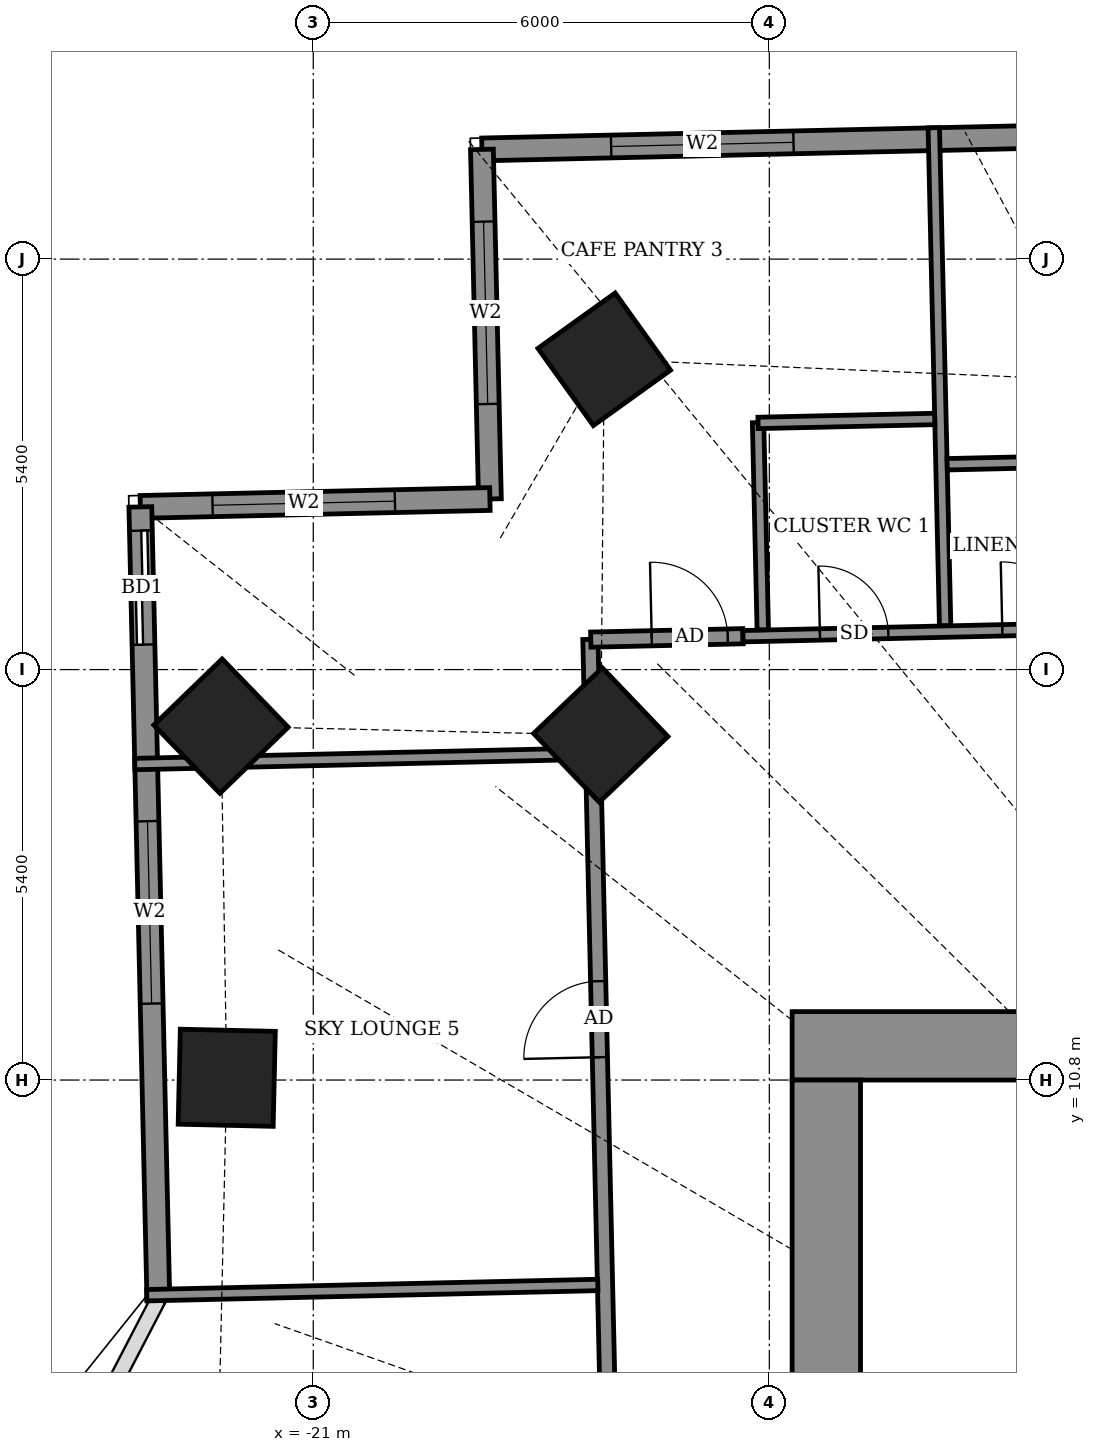
"""IFC4 building model, lengths in metres.
Left out: names, types, materials, properties, quantities, classifications, styles, units other than length and angle.
Written with IfcOpenShell. Run it as: python <this file> out.ifc"""

import sys

from ifc_helpers import new_model, si_unit, direction, frame, frame_2d, origin, origin_2d, place, context, subcontext, project, spatial, rectangle, extrude, element, fill, save


model = new_model("IFC4")
c1 = context("Model", 3, precision=1e-05, world=origin(), true_north=direction((0.0, 1.0)))
c2 = subcontext(c1, "Body", "Model", "MODEL_VIEW")
j1 = project(units=[si_unit("LENGTHUNIT", "METRE"), si_unit("PLANEANGLEUNIT", "RADIAN")], contexts=[c1])
p1 = place(None, origin())
s1 = spatial("IfcSite", under=j1, at=p1, CompositionType="ELEMENT")
p2 = place(p1, origin())
s2 = spatial("IfcBuilding", under=s1, at=p2, CompositionType="ELEMENT")
p3 = place(p2, frame((0.0, 0.0, 170.7)))
s3 = spatial("IfcBuildingStorey", under=s2, at=p3, CompositionType="ELEMENT", Elevation=170.7)
for number, where, z_axis, x_axis in (
    (1, (-17.172, 20.282, -0.55), (0.0, 0.0, 1.0), (-0.813, -0.583, 0.0)),
    (2, (-17.217, 15.339, -0.55), (0.0, 0.0, 1.0), (-0.723, -0.691, 0.0)),
    (3, (-22.213, 15.456, -0.55), (0.0, 0.0, 1.0), (-0.719, -0.695, 0.0)),
    (4, (-22.138, 10.83, -0.55), (0.0, 0.0, 1.0), (-0.023, -1.0, 0.0)),
):
    element("IfcColumn", number, at=place(p3, frame(where, z_axis=z_axis, x_axis=x_axis)), inside=s3, PredefinedType="COLUMN", context=c2, shape_type="SweptSolid", body=[
        extrude(rectangle(XDim=1.25, YDim=1.25, at=origin_2d()), origin(), (0.0, 0.0, 1.0), 4.6),
    ])
p4 = place(p3, frame((21.589, 23.959, 0.0), z_axis=(0.0, 0.0, 1.0), x_axis=(-0.999742671382, -0.022684598702, 0.0)))
e5 = element("IfcWall", 5, at=p4, inside=s3, PredefinedType="SOLIDWALL", context=c2, shape_type="SweptSolid", body=[
    extrude(rectangle(XDim=40.381, YDim=0.3, at=frame_2d((20.19, 0.0))), origin(), (0.0, 0.0, 1.0), 2.85),
])
p5 = place(p4, frame((2.89, 0.0, 0.0)))
e6 = element("IfcOpeningElement", 6, at=p5, cuts=e5, PredefinedType="OPENING", context=c2, shape_type="SweptSolid", body=[
    extrude(rectangle(XDim=1.5, YDim=2.4, at=frame_2d((0.75, 1.2))), frame((0.0, 0.16, 0.0), z_axis=(0.0, -1.0, 0.0), x_axis=(1.0, 0.0, 0.0)), (0.0, 0.0, 1.0), 0.32),
])
p6 = place(p4, frame((10.48, 0.0, 0.9)))
e7 = element("IfcOpeningElement", 7, at=p6, cuts=e5, PredefinedType="OPENING", context=c2, shape_type="SweptSolid", body=[
    extrude(rectangle(XDim=2.4, YDim=1.5, at=frame_2d((1.2, 0.75))), frame((0.0, 0.16, 0.0), z_axis=(0.0, -1.0, 0.0), x_axis=(1.0, 0.0, 0.0)), (0.0, 0.0, 1.0), 0.32),
])
p7 = place(p4, frame((17.68, 0.0, 0.0)))
e8 = element("IfcOpeningElement", 8, at=p7, cuts=e5, PredefinedType="OPENING", context=c2, shape_type="SweptSolid", body=[
    extrude(rectangle(XDim=1.5, YDim=2.4, at=frame_2d((0.75, 1.2))), frame((0.0, 0.16, 0.0), z_axis=(0.0, -1.0, 0.0), x_axis=(1.0, 0.0, 0.0)), (0.0, 0.0, 1.0), 0.32),
])
p8 = place(p4, frame((22.705, 0.0, 0.0)))
e9 = element("IfcOpeningElement", 9, at=p8, cuts=e5, PredefinedType="OPENING", context=c2, shape_type="SweptSolid", body=[
    extrude(rectangle(XDim=1.5, YDim=2.4, at=frame_2d((0.75, 1.2))), frame((0.0, 0.16, 0.0), z_axis=(0.0, -1.0, 0.0), x_axis=(1.0, 0.0, 0.0)), (0.0, 0.0, 1.0), 0.32),
])
p9 = place(p4, frame((29.005, 0.0, 0.9)))
e10 = element("IfcOpeningElement", 10, at=p9, cuts=e5, PredefinedType="OPENING", context=c2, shape_type="SweptSolid", body=[
    extrude(rectangle(XDim=2.4, YDim=1.5, at=frame_2d((1.2, 0.75))), frame((0.0, 0.16, 0.0), z_axis=(0.0, -1.0, 0.0), x_axis=(1.0, 0.0, 0.0)), (0.0, 0.0, 1.0), 0.32),
])
p10 = place(p4, frame((36.28, 0.0, 0.9)))
e11 = element("IfcOpeningElement", 11, at=p10, cuts=e5, PredefinedType="OPENING", context=c2, shape_type="SweptSolid", body=[
    extrude(rectangle(XDim=2.4, YDim=1.5, at=frame_2d((1.2, 0.75))), frame((0.0, 0.16, 0.0), z_axis=(0.0, -1.0, 0.0), x_axis=(1.0, 0.0, 0.0)), (0.0, 0.0, 1.0), 0.32),
])
p11 = place(p3, frame((-18.781, 23.043, 0.0), z_axis=(0.0, 0.0, 1.0), x_axis=(0.022821468877, -0.999739556364, 0.0)))
e12 = element("IfcWall", 12, at=p11, inside=s3, PredefinedType="SOLIDWALL", context=c2, shape_type="SweptSolid", body=[
    extrude(rectangle(XDim=4.6, YDim=0.3, at=frame_2d((2.3, 0.0))), origin(), (0.0, 0.0, 1.0), 2.85),
])
p12 = place(p11, frame((0.95, 0.0, 0.9)))
e13 = element("IfcOpeningElement", 13, at=p12, cuts=e12, PredefinedType="OPENING", context=c2, shape_type="SweptSolid", body=[
    extrude(rectangle(XDim=2.4, YDim=1.5, at=frame_2d((1.2, 0.75))), frame((0.0, 0.16, 0.0), z_axis=(0.0, -1.0, 0.0), x_axis=(1.0, 0.0, 0.0)), (0.0, 0.0, 1.0), 0.32),
])
p13 = place(p3, frame((-18.676, 18.444, 0.0), z_axis=(0.0, 0.0, 1.0), x_axis=(-0.999744377441, -0.022609285172, 0.0)))
e14 = element("IfcWall", 14, at=p13, inside=s3, PredefinedType="SOLIDWALL", context=c2, shape_type="SweptSolid", body=[
    extrude(rectangle(XDim=4.6, YDim=0.3, at=frame_2d((2.3, 0.0))), origin(), (0.0, 0.0, 1.0), 2.85),
])
p14 = place(p13, frame((1.25, 0.0, 0.9)))
e15 = element("IfcOpeningElement", 15, at=p14, cuts=e14, PredefinedType="OPENING", context=c2, shape_type="SweptSolid", body=[
    extrude(rectangle(XDim=2.4, YDim=1.5, at=frame_2d((1.2, 0.75))), frame((0.0, 0.16, 0.0), z_axis=(0.0, -1.0, 0.0), x_axis=(1.0, 0.0, 0.0)), (0.0, 0.0, 1.0), 0.32),
])
p15 = place(p3, frame((-23.275, 18.34, 0.0), z_axis=(0.0, 0.0, 1.0), x_axis=(0.022705985163, -0.999742185885, 0.0)))
e16 = element("IfcWall", 16, at=p15, inside=s3, PredefinedType="SOLIDWALL", context=c2, shape_type="SweptSolid", body=[
    extrude(rectangle(XDim=10.43, YDim=0.3, at=frame_2d((5.215, 0.0))), origin(), (0.0, 0.0, 1.0), 2.85),
])
p16 = place(p15, frame((0.312, 0.0, 0.0)))
e17 = element("IfcOpeningElement", 17, at=p16, cuts=e16, PredefinedType="OPENING", context=c2, shape_type="SweptSolid", body=[
    extrude(rectangle(XDim=1.5, YDim=2.4, at=frame_2d((0.75, 1.2))), frame((0.0, 0.16, 0.0), z_axis=(0.0, -1.0, 0.0), x_axis=(1.0, 0.0, 0.0)), (0.0, 0.0, 1.0), 0.32),
])
p17 = place(p15, frame((4.136, 0.0, 0.9)))
e18 = element("IfcOpeningElement", 18, at=p17, cuts=e16, PredefinedType="OPENING", context=c2, shape_type="SweptSolid", body=[
    extrude(rectangle(XDim=2.4, YDim=1.5, at=frame_2d((1.2, 0.75))), frame((0.0, 0.16, 0.0), z_axis=(0.0, -1.0, 0.0), x_axis=(1.0, 0.0, 0.0)), (0.0, 0.0, 1.0), 0.32),
])
p18 = place(p3, frame((-16.65, -14.418, 0.0), z_axis=(0.0, 0.0, 1.0), x_axis=(-0.022695485329, 0.9997424243, 0.0)))
e19 = element("IfcWall", 19, at=p18, inside=s3, PredefinedType="PARTITIONING", context=c2, shape_type="SweptSolid", body=[
    extrude(rectangle(XDim=31.024, YDim=0.2, at=frame_2d((15.512, 0.0))), origin(), (0.0, 0.0, 1.0), 2.75),
])
p19 = place(p18, frame((0.2, 0.0, 0.0)))
e20 = element("IfcOpeningElement", 20, at=p19, cuts=e19, PredefinedType="OPENING", context=c2, shape_type="SweptSolid", body=[
    extrude(rectangle(XDim=1.0, YDim=2.1, at=frame_2d((0.5, 1.05))), frame((0.0, 0.11, 0.0), z_axis=(0.0, -1.0, 0.0), x_axis=(1.0, 0.0, 0.0)), (0.0, 0.0, 1.0), 0.22),
])
p20 = place(p18, frame((25.525, 0.0, 0.0)))
e21 = element("IfcOpeningElement", 21, at=p20, cuts=e19, PredefinedType="OPENING", context=c2, shape_type="SweptSolid", body=[
    extrude(rectangle(XDim=1.0, YDim=2.1, at=frame_2d((0.5, 1.05))), frame((0.0, 0.11, 0.0), z_axis=(0.0, -1.0, 0.0), x_axis=(1.0, 0.0, 0.0)), (0.0, 0.0, 1.0), 0.22),
])
p21 = place(p18, frame((19.595, 0.0, 0.0)))
e22 = element("IfcOpeningElement", 22, at=p21, cuts=e19, PredefinedType="OPENING", context=c2, shape_type="SweptSolid", body=[
    extrude(rectangle(XDim=1.0, YDim=2.1, at=frame_2d((0.5, 1.05))), frame((0.0, 0.11, 0.0), z_axis=(0.0, -1.0, 0.0), x_axis=(1.0, 0.0, 0.0)), (0.0, 0.0, 1.0), 0.22),
])
p22 = place(p18, frame((13.825, 0.0, 0.0)))
e23 = element("IfcOpeningElement", 23, at=p22, cuts=e19, PredefinedType="OPENING", context=c2, shape_type="SweptSolid", body=[
    extrude(rectangle(XDim=1.0, YDim=2.1, at=frame_2d((0.5, 1.05))), frame((0.0, 0.11, 0.0), z_axis=(0.0, -1.0, 0.0), x_axis=(1.0, 0.0, 0.0)), (0.0, 0.0, 1.0), 0.22),
])
p23 = place(p18, frame((16.275, 0.0, 0.0)))
e24 = element("IfcOpeningElement", 24, at=p23, cuts=e19, PredefinedType="OPENING", context=c2, shape_type="SweptSolid", body=[
    extrude(rectangle(XDim=0.9, YDim=2.1, at=frame_2d((0.45, 1.05))), frame((0.0, 0.11, 0.0), z_axis=(0.0, -1.0, 0.0), x_axis=(1.0, 0.0, 0.0)), (0.0, 0.0, 1.0), 0.22),
])
p24 = place(p18, frame((11.65, 0.0, 0.0)))
e25 = element("IfcOpeningElement", 25, at=p24, cuts=e19, PredefinedType="OPENING", context=c2, shape_type="SweptSolid", body=[
    extrude(rectangle(XDim=1.0, YDim=2.1, at=frame_2d((0.5, 1.05))), frame((0.0, 0.11, 0.0), z_axis=(0.0, -1.0, 0.0), x_axis=(1.0, 0.0, 0.0)), (0.0, 0.0, 1.0), 0.22),
])
p25 = place(p18, frame((9.525, 0.0, 0.0)))
e26 = element("IfcOpeningElement", 26, at=p25, cuts=e19, PredefinedType="OPENING", context=c2, shape_type="SweptSolid", body=[
    extrude(rectangle(XDim=0.9, YDim=2.1, at=frame_2d((0.45, 1.05))), frame((0.0, 0.11, 0.0), z_axis=(0.0, -1.0, 0.0), x_axis=(1.0, 0.0, 0.0)), (0.0, 0.0, 1.0), 0.22),
])
p26 = place(p18, frame((3.337, 0.0, 0.0)))
e27 = element("IfcOpeningElement", 27, at=p26, cuts=e19, PredefinedType="OPENING", context=c2, shape_type="SweptSolid", body=[
    extrude(rectangle(XDim=1.0, YDim=2.1, at=frame_2d((0.5, 1.05))), frame((0.0, 0.11, 0.0), z_axis=(0.0, -1.0, 0.0), x_axis=(1.0, 0.0, 0.0)), (0.0, 0.0, 1.0), 0.22),
])
p27 = place(p18, frame((7.025, 0.0, 0.0)))
e28 = element("IfcOpeningElement", 28, at=p27, cuts=e19, PredefinedType="OPENING", context=c2, shape_type="SweptSolid", body=[
    extrude(rectangle(XDim=0.9, YDim=2.1, at=frame_2d((0.45, 1.05))), frame((0.0, 0.11, 0.0), z_axis=(0.0, -1.0, 0.0), x_axis=(1.0, 0.0, 0.0)), (0.0, 0.0, 1.0), 0.22),
])
p28 = place(p3, frame((-23.19, 7.969, 0.0), z_axis=(0.0, 0.0, 1.0), x_axis=(0.999741261868, 0.022746633113, 0.0)))
e29 = element("IfcWall", 29, at=p28, inside=s3, PredefinedType="PARTITIONING", context=c2, shape_type="SweptSolid", body=[
    extrude(rectangle(XDim=5.935, YDim=0.15, at=frame_2d((2.968, 0.0))), origin(), (0.0, 0.0, 1.0), 2.75),
])
p29 = place(p3, frame((-23.348, 14.957, 0.0), z_axis=(0.0, 0.0, 1.0), x_axis=(0.999741176717, 0.022750375323, 0.0)))
e30 = element("IfcWall", 30, at=p29, inside=s3, PredefinedType="PARTITIONING", context=c2, shape_type="SweptSolid", body=[
    extrude(rectangle(XDim=5.934, YDim=0.15, at=frame_2d((2.967, 0.0))), origin(), (0.0, 0.0, 1.0), 2.75),
])
p30 = place(p3, frame((-17.349, 16.594, 0.0), z_axis=(0.0, 0.0, 1.0), x_axis=(0.999748401469, 0.02243064332, 0.0)))
e31 = element("IfcWall", 31, at=p30, inside=s3, PredefinedType="PARTITIONING", context=c2, shape_type="SweptSolid", body=[
    extrude(rectangle(XDim=2.003, YDim=0.2, at=frame_2d((1.001, 0.0))), origin(), (0.0, 0.0, 1.0), 2.75),
])
p31 = place(p30, frame((0.802, 0.0, 0.0)))
e32 = element("IfcOpeningElement", 32, at=p31, cuts=e31, PredefinedType="OPENING", context=c2, shape_type="SweptSolid", body=[
    extrude(rectangle(XDim=1.0, YDim=2.1, at=frame_2d((0.5, 1.05))), frame((0.0, 0.11, 0.0), z_axis=(0.0, -1.0, 0.0), x_axis=(1.0, 0.0, 0.0)), (0.0, 0.0, 1.0), 0.22),
])
p32 = place(p3, frame((-15.346, 16.639, 0.0), z_axis=(0.0, 0.0, 1.0), x_axis=(0.999742506322, 0.022691871978, 0.0)))
e33 = element("IfcWall", 33, at=p32, inside=s3, PredefinedType="PARTITIONING", context=c2, shape_type="SweptSolid", body=[
    extrude(rectangle(XDim=30.233, YDim=0.15, at=frame_2d((15.116, 0.0))), origin(), (0.0, 0.0, 1.0), 2.85),
])
p33 = place(p32, frame((23.712, 0.0, 0.0)))
e34 = element("IfcOpeningElement", 34, at=p33, cuts=e33, PredefinedType="OPENING", context=c2, shape_type="SweptSolid", body=[
    extrude(rectangle(XDim=1.0, YDim=2.1, at=frame_2d((0.5, 1.05))), frame((0.0, 0.085, 0.0), z_axis=(0.0, -1.0, 0.0), x_axis=(1.0, 0.0, 0.0)), (0.0, 0.0, 1.0), 0.17),
])
p34 = place(p32, frame((28.012, 0.0, 0.0)))
e35 = element("IfcOpeningElement", 35, at=p34, cuts=e33, PredefinedType="OPENING", context=c2, shape_type="SweptSolid", body=[
    extrude(rectangle(XDim=0.9, YDim=2.1, at=frame_2d((0.45, 1.05))), frame((0.0, 0.085, 0.0), z_axis=(0.0, -1.0, 0.0), x_axis=(1.0, 0.0, 0.0)), (0.0, 0.0, 1.0), 0.17),
])
p35 = place(p32, frame((19.412, 0.0, 0.0)))
e36 = element("IfcOpeningElement", 36, at=p35, cuts=e33, PredefinedType="OPENING", context=c2, shape_type="SweptSolid", body=[
    extrude(rectangle(XDim=0.9, YDim=2.1, at=frame_2d((0.45, 1.05))), frame((0.0, 0.085, 0.0), z_axis=(0.0, -1.0, 0.0), x_axis=(1.0, 0.0, 0.0)), (0.0, 0.0, 1.0), 0.17),
])
p36 = place(p32, frame((11.987, 0.0, 0.0)))
e37 = element("IfcOpeningElement", 37, at=p36, cuts=e33, PredefinedType="OPENING", context=c2, shape_type="SweptSolid", body=[
    extrude(rectangle(XDim=0.9, YDim=2.1, at=frame_2d((0.45, 1.05))), frame((0.0, 0.085, 0.0), z_axis=(0.0, -1.0, 0.0), x_axis=(1.0, 0.0, 0.0)), (0.0, 0.0, 1.0), 0.17),
])
p37 = place(p32, frame((7.587, 0.0, 0.0)))
e38 = element("IfcOpeningElement", 38, at=p37, cuts=e33, PredefinedType="OPENING", context=c2, shape_type="SweptSolid", body=[
    extrude(rectangle(XDim=1.0, YDim=2.1, at=frame_2d((0.5, 1.05))), frame((0.0, 0.085, 0.0), z_axis=(0.0, -1.0, 0.0), x_axis=(1.0, 0.0, 0.0)), (0.0, 0.0, 1.0), 0.17),
])
p38 = place(p32, frame((3.412, 0.0, 0.0)))
e39 = element("IfcOpeningElement", 39, at=p38, cuts=e33, PredefinedType="OPENING", context=c2, shape_type="SweptSolid", body=[
    extrude(rectangle(XDim=0.9, YDim=2.1, at=frame_2d((0.45, 1.05))), frame((0.0, 0.085, 0.0), z_axis=(0.0, -1.0, 0.0), x_axis=(1.0, 0.0, 0.0)), (0.0, 0.0, 1.0), 0.17),
])
p39 = place(p32, frame((1.012, 0.0, 0.0)))
e40 = element("IfcOpeningElement", 40, at=p39, cuts=e33, PredefinedType="OPENING", context=c2, shape_type="SweptSolid", body=[
    extrude(rectangle(XDim=0.9, YDim=2.1, at=frame_2d((0.45, 1.05))), frame((0.0, 0.085, 0.0), z_axis=(0.0, -1.0, 0.0), x_axis=(1.0, 0.0, 0.0)), (0.0, 0.0, 1.0), 0.17),
])
p40 = place(p3, frame((-15.086, 16.724, 0.0), z_axis=(0.0, 0.0, 1.0), x_axis=(-0.022751926344, 0.99974114142, 0.0)))
e41 = element("IfcWall", 41, at=p40, inside=s3, PredefinedType="PARTITIONING", context=c2, shape_type="SweptSolid", body=[
    extrude(rectangle(XDim=2.726, YDim=0.15, at=frame_2d((1.363, 0.0))), origin(), (0.0, 0.0, 1.0), 2.85),
])
p41 = place(p3, frame((-12.687, 16.779, 0.0), z_axis=(0.0, 0.0, 1.0), x_axis=(-0.022734951231, 0.999741527592, 0.0)))
e42 = element("IfcWall", 42, at=p41, inside=s3, PredefinedType="PARTITIONING", context=c2, shape_type="SweptSolid", body=[
    extrude(rectangle(XDim=6.551, YDim=0.15, at=frame_2d((3.275, 0.0))), origin(), (0.0, 0.0, 1.0), 2.75),
])
p42 = place(p3, frame((-12.66, 18.901, 0.0), z_axis=(0.0, 0.0, 1.0), x_axis=(0.999737862264, 0.022895561926, 0.0)))
e43 = element("IfcWall", 43, at=p42, inside=s3, PredefinedType="PARTITIONING", context=c2, shape_type="SweptSolid", body=[
    extrude(rectangle(XDim=2.324, YDim=0.15, at=frame_2d((1.162, 0.0))), origin(), (0.0, 0.0, 1.0), 2.85),
])
p43 = place(p3, frame((-15.148, 19.445, 0.0), z_axis=(0.0, 0.0, 1.0), x_axis=(0.999749744571, 0.022370700241, 0.0)))
e44 = element("IfcWall", 44, at=p43, inside=s3, PredefinedType="PARTITIONING", context=c2, shape_type="SweptSolid", body=[
    extrude(rectangle(XDim=2.324, YDim=0.15, at=frame_2d((1.162, 0.0))), origin(), (0.0, 0.0, 1.0), 2.75),
])
p44 = place(p3, frame((-14.7, 11.25, 0.0), z_axis=(0.0, 0.0, 1.0), x_axis=(1.0, 0.0, 0.0)))
e45 = element("IfcWall", 45, at=p44, inside=s3, PredefinedType="SHEAR", context=c2, shape_type="SweptSolid", body=[
    extrude(rectangle(XDim=29.4, YDim=0.9, at=frame_2d((14.7, 0.0))), origin(), (0.0, 0.0, 1.0), 4.6),
])
p45 = place(p3, frame((-14.25, -10.8, 0.0), z_axis=(0.0, 0.0, 1.0), x_axis=(0.0, 1.0, 0.0)))
e46 = element("IfcWall", 46, at=p45, inside=s3, PredefinedType="SHEAR", context=c2, shape_type="SweptSolid", body=[
    extrude(rectangle(XDim=21.6, YDim=0.9, at=frame_2d((10.8, 0.0))), origin(), (0.0, 0.0, 1.0), 4.6),
])
p46 = place(p45, frame((8.25, 0.0, 0.0)))
e47 = element("IfcOpeningElement", 47, at=p46, cuts=e46, PredefinedType="OPENING", context=c2, shape_type="SweptSolid", body=[
    extrude(rectangle(XDim=1.2, YDim=2.1, at=frame_2d((0.6, 1.05))), frame((0.0, 0.46, 0.0), z_axis=(0.0, -1.0, 0.0), x_axis=(1.0, 0.0, 0.0)), (0.0, 0.0, 1.0), 0.92),
])
p47 = place(p45, frame((15.25, 0.0, 0.0)))
e48 = element("IfcOpeningElement", 48, at=p47, cuts=e46, PredefinedType="OPENING", context=c2, shape_type="SweptSolid", body=[
    extrude(rectangle(XDim=1.2, YDim=2.1, at=frame_2d((0.6, 1.05))), frame((0.0, 0.46, 0.0), z_axis=(0.0, -1.0, 0.0), x_axis=(1.0, 0.0, 0.0)), (0.0, 0.0, 1.0), 0.92),
])
p48 = place(p10, origin())
e49 = element("IfcWindow", 49, at=p48, inside=s3, PartitioningType="DOUBLE_PANEL_VERTICAL", PredefinedType="WINDOW", context=c2, shape_type="SweptSolid", body=[
    extrude(rectangle(XDim=2.4, YDim=1.5, at=frame_2d((1.2, 0.75))), frame((0.0, 0.03, 0.0), z_axis=(0.0, -1.0, 0.0), x_axis=(1.0, 0.0, 0.0)), (0.0, 0.0, 1.0), 0.06),
])
fill(e11, e49)
p49 = place(p12, origin())
e50 = element("IfcWindow", 50, at=p49, inside=s3, PartitioningType="DOUBLE_PANEL_VERTICAL", PredefinedType="WINDOW", context=c2, shape_type="SweptSolid", body=[
    extrude(rectangle(XDim=2.4, YDim=1.5, at=frame_2d((1.2, 0.75))), frame((0.0, 0.03, 0.0), z_axis=(0.0, -1.0, 0.0), x_axis=(1.0, 0.0, 0.0)), (0.0, 0.0, 1.0), 0.06),
])
fill(e13, e50)
p50 = place(p14, origin())
e51 = element("IfcWindow", 51, at=p50, inside=s3, PartitioningType="DOUBLE_PANEL_VERTICAL", PredefinedType="WINDOW", context=c2, shape_type="SweptSolid", body=[
    extrude(rectangle(XDim=2.4, YDim=1.5, at=frame_2d((1.2, 0.75))), frame((0.0, 0.03, 0.0), z_axis=(0.0, -1.0, 0.0), x_axis=(1.0, 0.0, 0.0)), (0.0, 0.0, 1.0), 0.06),
])
fill(e15, e51)
p51 = place(p16, origin())
e52 = element("IfcDoor", 52, at=p51, inside=s3, OperationType="SLIDING_TO_LEFT", PredefinedType="DOOR", context=c2, shape_type="SweptSolid", body=[
    extrude(rectangle(XDim=1.5, YDim=2.4, at=frame_2d((0.75, 1.2))), frame((0.0, 0.025, 0.0), z_axis=(0.0, -1.0, 0.0), x_axis=(1.0, 0.0, 0.0)), (0.0, 0.0, 1.0), 0.05),
])
fill(e17, e52)
p52 = place(p17, origin())
e53 = element("IfcWindow", 53, at=p52, inside=s3, PartitioningType="DOUBLE_PANEL_VERTICAL", PredefinedType="WINDOW", context=c2, shape_type="SweptSolid", body=[
    extrude(rectangle(XDim=2.4, YDim=1.5, at=frame_2d((1.2, 0.75))), frame((0.0, 0.03, 0.0), z_axis=(0.0, -1.0, 0.0), x_axis=(1.0, 0.0, 0.0)), (0.0, 0.0, 1.0), 0.06),
])
fill(e18, e53)
p53 = place(p38, origin())
e54 = element("IfcDoor", 54, at=p53, inside=s3, OperationType="SINGLE_SWING_RIGHT", PredefinedType="DOOR", context=c2, shape_type="SweptSolid", body=[
    extrude(rectangle(XDim=0.9, YDim=2.1, at=frame_2d((0.45, 1.05))), frame((0.0, 0.025, 0.0), z_axis=(0.0, -1.0, 0.0), x_axis=(1.0, 0.0, 0.0)), (0.0, 0.0, 1.0), 0.05),
])
fill(e39, e54)
p54 = place(p31, origin())
e55 = element("IfcDoor", 55, at=p54, inside=s3, OperationType="SINGLE_SWING_LEFT", PredefinedType="DOOR", context=c2, shape_type="SweptSolid", body=[
    extrude(rectangle(XDim=1.0, YDim=2.1, at=frame_2d((0.5, 1.05))), frame((0.0, 0.025, 0.0), z_axis=(0.0, -1.0, 0.0), x_axis=(1.0, 0.0, 0.0)), (0.0, 0.0, 1.0), 0.05),
])
fill(e32, e55)
p55 = place(p39, origin())
e56 = element("IfcDoor", 56, at=p55, inside=s3, OperationType="SINGLE_SWING_LEFT", PredefinedType="DOOR", context=c2, shape_type="SweptSolid", body=[
    extrude(rectangle(XDim=0.9, YDim=2.1, at=frame_2d((0.45, 1.05))), frame((0.0, 0.025, 0.0), z_axis=(0.0, -1.0, 0.0), x_axis=(1.0, 0.0, 0.0)), (0.0, 0.0, 1.0), 0.05),
])
fill(e40, e56)
p56 = place(p20, origin())
e57 = element("IfcDoor", 57, at=p56, inside=s3, OperationType="SINGLE_SWING_RIGHT", PredefinedType="DOOR", context=c2, shape_type="SweptSolid", body=[
    extrude(rectangle(XDim=1.0, YDim=2.1, at=frame_2d((0.5, 1.05))), frame((0.0, 0.025, 0.0), z_axis=(0.0, -1.0, 0.0), x_axis=(1.0, 0.0, 0.0)), (0.0, 0.0, 1.0), 0.05),
])
fill(e21, e57)
save(model, sys.argv[1])
